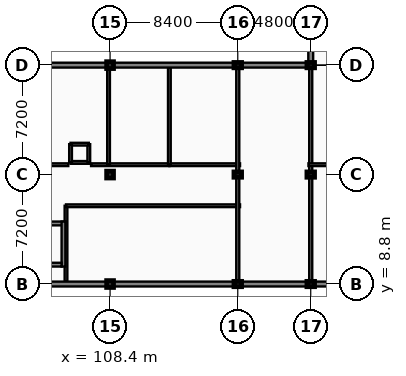
"""IFC4 building model, lengths in metres.
Left out: names, types, materials, properties, quantities, classifications, styles, units other than length and angle.
Written with IfcOpenShell. Run it as: python <this file> out.ifc"""

import sys

from ifc_helpers import new_model, si_unit, direction, frame, frame_2d, origin, origin_2d, place, context, subcontext, project, spatial, rectangle, extrude, element, fill, save


model = new_model("IFC4")
c1 = context("Model", 3, precision=1e-05, world=origin(), true_north=direction((0.0, 1.0)))
c2 = subcontext(c1, "Body", "Model", "MODEL_VIEW")
j1 = project(units=[si_unit("LENGTHUNIT", "METRE"), si_unit("PLANEANGLEUNIT", "RADIAN")], contexts=[c1])
p1 = place(None, origin())
s1 = spatial("IfcSite", under=j1, at=p1, CompositionType="ELEMENT")
p2 = place(p1, origin())
s2 = spatial("IfcBuilding", under=s1, at=p2, CompositionType="ELEMENT")
p3 = place(p2, origin())
s3 = spatial("IfcBuildingStorey", under=s2, at=p3, CompositionType="ELEMENT", Elevation=0.0)
for number, where, z_axis, x_axis in (
    (1, (108.4, 8.8, 0.0), (0.0, 0.0, 1.0), (1.0, 0.0, 0.0)),
    (2, (108.4, 16.0, 0.0), (0.0, 0.0, 1.0), (1.0, 0.0, 0.0)),
    (3, (108.4, 23.2, 0.0), (0.0, 0.0, 1.0), (1.0, 0.0, 0.0)),
):
    element("IfcColumn", number, at=place(p3, frame(where, z_axis=z_axis, x_axis=x_axis)), inside=s3, PredefinedType="COLUMN", context=c2, shape_type="SweptSolid", body=[
        extrude(rectangle(XDim=0.45, YDim=0.45, at=origin_2d()), origin(), (0.0, 0.0, 1.0), 5.4),
    ])
for number, where, z_axis, x_axis in (
    (4, (116.8, 8.8, 0.0), (0.0, 0.0, 1.0), (1.0, 0.0, 0.0)),
    (5, (116.8, 16.0, 0.0), (0.0, 0.0, 1.0), (1.0, 0.0, 0.0)),
    (6, (116.8, 23.2, 0.0), (0.0, 0.0, 1.0), (1.0, 0.0, 0.0)),
    (7, (121.6, 8.8, 0.0), (0.0, 0.0, 1.0), (1.0, 0.0, 0.0)),
    (8, (121.6, 16.0, 0.0), (0.0, 0.0, 1.0), (1.0, 0.0, 0.0)),
    (9, (121.6, 23.2, 0.0), (0.0, 0.0, 1.0), (1.0, 0.0, 0.0)),
):
    element("IfcColumn", number, at=place(p3, frame(where, z_axis=z_axis, x_axis=x_axis)), inside=s3, PredefinedType="PILASTER", context=c2, shape_type="SweptSolid", body=[
        extrude(rectangle(XDim=0.5, YDim=0.35, at=origin_2d()), origin(), (0.0, 0.0, 1.0), 5.4),
    ])
p4 = place(p3, frame((105.5, 8.95, 0.0), z_axis=(0.0, 0.0, 1.0), x_axis=(0.0, 1.0, 0.0)))
e10 = element("IfcWall", 10, at=p4, inside=s3, PredefinedType="PARTITIONING", context=c2, shape_type="SweptSolid", body=[
    extrude(rectangle(XDim=5.0, YDim=0.18, at=frame_2d((2.5, 0.0))), origin(), (0.0, 0.0, 1.0), 4.64),
])
p5 = place(p3, frame((105.5, 13.95, 0.0), z_axis=(0.0, 0.0, 1.0), x_axis=(1.0, 0.0, 0.0)))
e11 = element("IfcWall", 11, at=p5, inside=s3, PredefinedType="PARTITIONING", context=c2, shape_type="SweptSolid", body=[
    extrude(rectangle(XDim=11.45, YDim=0.18, at=frame_2d((5.725, 0.0))), origin(), (0.0, 0.0, 1.0), 4.64),
])
p6 = place(p5, frame((5.225, 0.0, -0.01)))
e12 = element("IfcOpeningElement", 12, at=p6, cuts=e11, PredefinedType="OPENING", context=c2, shape_type="SweptSolid", body=[
    extrude(rectangle(XDim=1.0, YDim=2.16, at=frame_2d((0.5, 1.08))), frame((0.0, 0.1, 0.0), z_axis=(0.0, -1.0, 0.0), x_axis=(1.0, 0.0, 0.0)), (0.0, 0.0, 1.0), 0.2),
])
p7 = place(p3, frame((91.45, 16.65, 0.0), z_axis=(0.0, 0.0, 1.0), x_axis=(1.0, 0.0, 0.0)))
e13 = element("IfcWall", 13, at=p7, inside=s3, PredefinedType="PARTITIONING", context=c2, shape_type="SweptSolid", body=[
    extrude(rectangle(XDim=14.2, YDim=0.18, at=frame_2d((7.1, 0.0))), origin(), (0.0, 0.0, 1.0), 4.64),
])
p8 = place(p7, frame((5.67, 0.0, -0.01)))
e14 = element("IfcOpeningElement", 14, at=p8, cuts=e13, PredefinedType="OPENING", context=c2, shape_type="SweptSolid", body=[
    extrude(rectangle(XDim=1.6, YDim=2.21, at=frame_2d((0.8, 1.105))), frame((0.0, 0.1, 0.0), z_axis=(0.0, -1.0, 0.0), x_axis=(1.0, 0.0, 0.0)), (0.0, 0.0, 1.0), 0.2),
])
p9 = place(p3, frame((107.15, 16.65, 0.0), z_axis=(0.0, 0.0, 1.0), x_axis=(1.0, 0.0, 0.0)))
e15 = element("IfcWall", 15, at=p9, inside=s3, PredefinedType="PARTITIONING", context=c2, shape_type="SweptSolid", body=[
    extrude(rectangle(XDim=5.15, YDim=0.18, at=frame_2d((2.575, 0.0))), origin(), (0.0, 0.0, 1.0), 4.64),
])
p10 = place(p9, frame((2.697, 0.0, -0.01)))
e16 = element("IfcOpeningElement", 16, at=p10, cuts=e15, PredefinedType="OPENING", context=c2, shape_type="SweptSolid", body=[
    extrude(rectangle(XDim=1.0, YDim=2.16, at=frame_2d((0.5, 1.08))), frame((0.0, 0.1, 0.0), z_axis=(0.0, -1.0, 0.0), x_axis=(1.0, 0.0, 0.0)), (0.0, 0.0, 1.0), 0.2),
])
p11 = place(p3, frame((112.3, 16.65, 0.0), z_axis=(0.0, 0.0, 1.0), x_axis=(1.0, 0.0, 0.0)))
e17 = element("IfcWall", 17, at=p11, inside=s3, PredefinedType="PARTITIONING", context=c2, shape_type="SweptSolid", body=[
    extrude(rectangle(XDim=4.65, YDim=0.18, at=frame_2d((2.325, 0.0))), origin(), (0.0, 0.0, 1.0), 4.64),
])
p12 = place(p11, frame((1.825, 0.0, -0.01)))
e18 = element("IfcOpeningElement", 18, at=p12, cuts=e17, PredefinedType="OPENING", context=c2, shape_type="SweptSolid", body=[
    extrude(rectangle(XDim=1.0, YDim=2.16, at=frame_2d((0.5, 1.08))), frame((0.0, 0.1, 0.0), z_axis=(0.0, -1.0, 0.0), x_axis=(1.0, 0.0, 0.0)), (0.0, 0.0, 1.0), 0.2),
])
for number, where, z_axis, x_axis in (
    (19, (108.3, 16.65, 0.0), (0.0, 0.0, 1.0), (0.0, 1.0, 0.0)),
    (20, (112.3, 16.65, 0.0), (0.0, 0.0, 1.0), (0.0, 1.0, 0.0)),
):
    element("IfcWall", number, at=place(p3, frame(where, z_axis=z_axis, x_axis=x_axis)), inside=s3, PredefinedType="PARTITIONING", context=c2, shape_type="SweptSolid", body=[
        extrude(rectangle(XDim=6.4, YDim=0.18, at=frame_2d((3.2, 0.0))), origin(), (0.0, 0.0, 1.0), 4.64),
    ])
p13 = place(p3, frame((116.8, 8.95, 0.0), z_axis=(0.0, 0.0, 1.0), x_axis=(0.0, 1.0, 0.0)))
e21 = element("IfcWall", 21, at=p13, inside=s3, PredefinedType="PARTITIONING", context=c2, shape_type="SweptSolid", body=[
    extrude(rectangle(XDim=14.1, YDim=0.2, at=frame_2d((7.05, 0.0))), origin(), (0.0, 0.0, 1.0), 3.99),
])
p14 = place(p13, frame((8.364, 0.0, -0.01)))
e22 = element("IfcOpeningElement", 22, at=p14, cuts=e21, PredefinedType="OPENING", context=c2, shape_type="SweptSolid", body=[
    extrude(rectangle(XDim=1.8, YDim=2.26, at=frame_2d((0.9, 1.13))), frame((0.0, 0.11, 0.0), z_axis=(0.0, -1.0, 0.0), x_axis=(1.0, 0.0, 0.0)), (0.0, 0.0, 1.0), 0.22),
])
p15 = place(p3, frame((121.6, 8.95, 0.0), z_axis=(0.0, 0.0, 1.0), x_axis=(0.0, 1.0, 0.0)))
e23 = element("IfcWall", 23, at=p15, inside=s3, PredefinedType="PARTITIONING", context=c2, shape_type="SweptSolid", body=[
    extrude(rectangle(XDim=14.1, YDim=0.2, at=frame_2d((7.05, 0.0))), origin(), (0.0, 0.0, 1.0), 3.99),
])
p16 = place(p15, frame((3.936, 0.0, -0.01)))
e24 = element("IfcOpeningElement", 24, at=p16, cuts=e23, PredefinedType="OPENING", context=c2, shape_type="SweptSolid", body=[
    extrude(rectangle(XDim=1.8, YDim=2.26, at=frame_2d((0.9, 1.13))), frame((0.0, 0.11, 0.0), z_axis=(0.0, -1.0, 0.0), x_axis=(1.0, 0.0, 0.0)), (0.0, 0.0, 1.0), 0.22),
])
p17 = place(p3, frame((121.45, 16.65, 0.0), z_axis=(0.0, 0.0, 1.0), x_axis=(1.0, 0.0, 0.0)))
e25 = element("IfcWall", 25, at=p17, inside=s3, PredefinedType="PARTITIONING", context=c2, shape_type="SweptSolid", body=[
    extrude(rectangle(XDim=15.1, YDim=0.18, at=frame_2d((7.55, 0.0))), origin(), (0.0, 0.0, 1.0), 4.64),
])
p18 = place(p17, frame((4.512, 0.0, -0.01)))
e26 = element("IfcOpeningElement", 26, at=p18, cuts=e25, PredefinedType="OPENING", context=c2, shape_type="SweptSolid", body=[
    extrude(rectangle(XDim=1.0, YDim=2.16, at=frame_2d((0.5, 1.08))), frame((0.0, 0.1, 0.0), z_axis=(0.0, -1.0, 0.0), x_axis=(1.0, 0.0, 0.0)), (0.0, 0.0, 1.0), 0.2),
])
p19 = place(p3, frame((100.0, 8.8, 0.0), z_axis=(0.0, 0.0, 1.0), x_axis=(1.0, 0.0, 0.0)))
e27 = element("IfcWall", 27, at=p19, inside=s3, PredefinedType="SOLIDWALL", context=c2, shape_type="SweptSolid", body=[
    extrude(rectangle(XDim=8.4, YDim=0.32, at=frame_2d((4.2, 0.0))), origin(), (0.0, 0.0, 1.0), 4.64),
])
p20 = place(p19, frame((3.2, 0.0, -0.01)))
e28 = element("IfcOpeningElement", 28, at=p20, cuts=e27, PredefinedType="OPENING", context=c2, shape_type="SweptSolid", body=[
    extrude(rectangle(XDim=2.0, YDim=2.41, at=frame_2d((1.0, 1.205))), frame((0.0, 0.17, 0.0), z_axis=(0.0, -1.0, 0.0), x_axis=(1.0, 0.0, 0.0)), (0.0, 0.0, 1.0), 0.34),
])
p21 = place(p3, frame((108.4, 8.8, 0.0), z_axis=(0.0, 0.0, 1.0), x_axis=(1.0, 0.0, 0.0)))
e29 = element("IfcWall", 29, at=p21, inside=s3, PredefinedType="SOLIDWALL", context=c2, shape_type="SweptSolid", body=[
    extrude(rectangle(XDim=8.4, YDim=0.32, at=frame_2d((4.2, 0.0))), origin(), (0.0, 0.0, 1.0), 3.99),
])
p22 = place(p21, frame((0.46, 0.0, 0.9)))
e30 = element("IfcOpeningElement", 30, at=p22, cuts=e29, PredefinedType="OPENING", context=c2, shape_type="SweptSolid", body=[
    extrude(rectangle(XDim=2.4, YDim=2.35, at=frame_2d((1.2, 1.175))), frame((0.0, 0.17, 0.0), z_axis=(0.0, -1.0, 0.0), x_axis=(1.0, 0.0, 0.0)), (0.0, 0.0, 1.0), 0.34),
])
p23 = place(p21, frame((5.46, 0.0, 0.9)))
e31 = element("IfcOpeningElement", 31, at=p23, cuts=e29, PredefinedType="OPENING", context=c2, shape_type="SweptSolid", body=[
    extrude(rectangle(XDim=2.4, YDim=2.35, at=frame_2d((1.2, 1.175))), frame((0.0, 0.17, 0.0), z_axis=(0.0, -1.0, 0.0), x_axis=(1.0, 0.0, 0.0)), (0.0, 0.0, 1.0), 0.34),
])
p24 = place(p3, frame((108.4, 23.2, 0.0), z_axis=(0.0, 0.0, 1.0), x_axis=(-1.0, 0.0, 0.0)))
e32 = element("IfcWall", 32, at=p24, inside=s3, PredefinedType="SOLIDWALL", context=c2, shape_type="SweptSolid", body=[
    extrude(rectangle(XDim=8.4, YDim=0.32, at=frame_2d((4.2, 0.0))), origin(), (0.0, 0.0, 1.0), 4.64),
])
p25 = place(p24, frame((0.46, 0.0, 0.9)))
e33 = element("IfcOpeningElement", 33, at=p25, cuts=e32, PredefinedType="OPENING", context=c2, shape_type="SweptSolid", body=[
    extrude(rectangle(XDim=2.4, YDim=2.35, at=frame_2d((1.2, 1.175))), frame((0.0, 0.17, 0.0), z_axis=(0.0, -1.0, 0.0), x_axis=(1.0, 0.0, 0.0)), (0.0, 0.0, 1.0), 0.34),
])
p26 = place(p24, frame((5.46, 0.0, 0.9)))
e34 = element("IfcOpeningElement", 34, at=p26, cuts=e32, PredefinedType="OPENING", context=c2, shape_type="SweptSolid", body=[
    extrude(rectangle(XDim=2.4, YDim=2.35, at=frame_2d((1.2, 1.175))), frame((0.0, 0.17, 0.0), z_axis=(0.0, -1.0, 0.0), x_axis=(1.0, 0.0, 0.0)), (0.0, 0.0, 1.0), 0.34),
])
p27 = place(p3, frame((116.8, 23.2, 0.0), z_axis=(0.0, 0.0, 1.0), x_axis=(-1.0, 0.0, 0.0)))
e35 = element("IfcWall", 35, at=p27, inside=s3, PredefinedType="SOLIDWALL", context=c2, shape_type="SweptSolid", body=[
    extrude(rectangle(XDim=8.4, YDim=0.32, at=frame_2d((4.2, 0.0))), origin(), (0.0, 0.0, 1.0), 3.99),
])
p28 = place(p27, frame((0.46, 0.0, 0.9)))
e36 = element("IfcOpeningElement", 36, at=p28, cuts=e35, PredefinedType="OPENING", context=c2, shape_type="SweptSolid", body=[
    extrude(rectangle(XDim=2.4, YDim=2.35, at=frame_2d((1.2, 1.175))), frame((0.0, 0.17, 0.0), z_axis=(0.0, -1.0, 0.0), x_axis=(1.0, 0.0, 0.0)), (0.0, 0.0, 1.0), 0.34),
])
p29 = place(p27, frame((5.46, 0.0, 0.9)))
e37 = element("IfcOpeningElement", 37, at=p29, cuts=e35, PredefinedType="OPENING", context=c2, shape_type="SweptSolid", body=[
    extrude(rectangle(XDim=2.4, YDim=2.35, at=frame_2d((1.2, 1.175))), frame((0.0, 0.17, 0.0), z_axis=(0.0, -1.0, 0.0), x_axis=(1.0, 0.0, 0.0)), (0.0, 0.0, 1.0), 0.34),
])
p30 = place(p3, frame((121.6, 8.8, 0.0), z_axis=(0.0, 0.0, 1.0), x_axis=(1.0, 0.0, 0.0)))
e38 = element("IfcWall", 38, at=p30, inside=s3, PredefinedType="SOLIDWALL", context=c2, shape_type="SweptSolid", body=[
    extrude(rectangle(XDim=7.8, YDim=0.32, at=frame_2d((3.9, 0.0))), origin(), (0.0, 0.0, 1.0), 3.99),
])
p31 = place(p30, frame((4.06, 0.0, 0.9)))
e39 = element("IfcOpeningElement", 39, at=p31, cuts=e38, PredefinedType="OPENING", context=c2, shape_type="SweptSolid", body=[
    extrude(rectangle(XDim=2.4, YDim=2.35, at=frame_2d((1.2, 1.175))), frame((0.0, 0.17, 0.0), z_axis=(0.0, -1.0, 0.0), x_axis=(1.0, 0.0, 0.0)), (0.0, 0.0, 1.0), 0.34),
])
p32 = place(p3, frame((121.6, 30.4, 0.0), z_axis=(0.0, 0.0, 1.0), x_axis=(0.0, -1.0, 0.0)))
e40 = element("IfcWall", 40, at=p32, inside=s3, PredefinedType="SOLIDWALL", context=c2, shape_type="SweptSolid", body=[
    extrude(rectangle(XDim=7.2, YDim=0.32, at=frame_2d((3.6, 0.0))), origin(), (0.0, 0.0, 1.0), 3.99),
])
p33 = place(p32, frame((2.6, 0.0, -0.01)))
e41 = element("IfcOpeningElement", 41, at=p33, cuts=e40, PredefinedType="OPENING", context=c2, shape_type="SweptSolid", body=[
    extrude(rectangle(XDim=2.0, YDim=2.41, at=frame_2d((1.0, 1.205))), frame((0.0, 0.17, 0.0), z_axis=(0.0, -1.0, 0.0), x_axis=(1.0, 0.0, 0.0)), (0.0, 0.0, 1.0), 0.34),
])
p34 = place(p3, frame((116.8, 8.8, 0.0), z_axis=(0.0, 0.0, 1.0), x_axis=(1.0, 0.0, 0.0)))
e42 = element("IfcWall", 42, at=p34, inside=s3, PredefinedType="SOLIDWALL", context=c2, shape_type="SweptSolid", body=[
    extrude(rectangle(XDim=4.8, YDim=0.32, at=frame_2d((2.4, 0.0))), origin(), (0.0, 0.0, 1.0), 3.99),
])
p35 = place(p34, frame((1.46, 0.0, 0.9)))
e43 = element("IfcOpeningElement", 43, at=p35, cuts=e42, PredefinedType="OPENING", context=c2, shape_type="SweptSolid", body=[
    extrude(rectangle(XDim=1.8, YDim=2.2, at=frame_2d((0.9, 1.1))), frame((0.0, 0.17, 0.0), z_axis=(0.0, -1.0, 0.0), x_axis=(1.0, 0.0, 0.0)), (0.0, 0.0, 1.0), 0.34),
])
p36 = place(p3, frame((121.6, 23.2, 0.0), z_axis=(0.0, 0.0, 1.0), x_axis=(-1.0, 0.0, 0.0)))
e44 = element("IfcWall", 44, at=p36, inside=s3, PredefinedType="SOLIDWALL", context=c2, shape_type="SweptSolid", body=[
    extrude(rectangle(XDim=4.8, YDim=0.32, at=frame_2d((2.4, 0.0))), origin(), (0.0, 0.0, 1.0), 3.99),
])
p37 = place(p36, frame((1.46, 0.0, 0.9)))
e45 = element("IfcOpeningElement", 45, at=p37, cuts=e44, PredefinedType="OPENING", context=c2, shape_type="SweptSolid", body=[
    extrude(rectangle(XDim=1.8, YDim=2.2, at=frame_2d((0.9, 1.1))), frame((0.0, 0.17, 0.0), z_axis=(0.0, -1.0, 0.0), x_axis=(1.0, 0.0, 0.0)), (0.0, 0.0, 1.0), 0.34),
])
p38 = place(p3, frame((103.25, 12.785, 0.0), z_axis=(0.0, 0.0, 1.0), x_axis=(1.0, 0.0, 0.0)))
e46 = element("IfcWall", 46, at=p38, inside=s3, PredefinedType="SHEAR", context=c2, shape_type="SweptSolid", body=[
    extrude(rectangle(XDim=2.21, YDim=0.25, at=frame_2d((1.105, 0.0))), origin(), (0.0, 0.0, 1.0), 5.4),
])
p39 = place(p3, frame((105.335, 9.95, 0.0), z_axis=(0.0, 0.0, 1.0), x_axis=(0.0, 1.0, 0.0)))
e47 = element("IfcWall", 47, at=p39, inside=s3, PredefinedType="SHEAR", context=c2, shape_type="SweptSolid", body=[
    extrude(rectangle(XDim=2.96, YDim=0.25, at=frame_2d((1.48, 0.0))), origin(), (0.0, 0.0, 1.0), 5.4),
])
p40 = place(p3, frame((103.25, 10.075, 0.0), z_axis=(0.0, 0.0, 1.0), x_axis=(1.0, 0.0, 0.0)))
e48 = element("IfcWall", 48, at=p40, inside=s3, PredefinedType="SHEAR", context=c2, shape_type="SweptSolid", body=[
    extrude(rectangle(XDim=1.96, YDim=0.25, at=frame_2d((0.98, 0.0))), origin(), (0.0, 0.0, 1.0), 5.4),
])
p41 = place(p40, frame((0.43, 0.0, -0.01)))
e49 = element("IfcOpeningElement", 49, at=p41, cuts=e48, PredefinedType="OPENING", context=c2, shape_type="SweptSolid", body=[
    extrude(rectangle(XDim=1.1, YDim=2.16, at=frame_2d((0.55, 1.08))), frame((0.0, 0.135, 0.0), z_axis=(0.0, -1.0, 0.0), x_axis=(1.0, 0.0, 0.0)), (0.0, 0.0, 1.0), 0.27),
])
p42 = place(p3, frame((105.8, 16.8, 0.0), z_axis=(0.0, 0.0, 1.0), x_axis=(1.0, 0.0, 0.0)))
e50 = element("IfcWall", 50, at=p42, inside=s3, PredefinedType="SOLIDWALL", context=c2, shape_type="SweptSolid", body=[
    extrude(rectangle(XDim=1.2, YDim=0.18, at=frame_2d((0.6, 0.0))), origin(), (0.0, 0.0, 1.0), 5.07),
])
p43 = place(p42, frame((0.2, 0.0, -0.01)))
e51 = element("IfcOpeningElement", 51, at=p43, cuts=e50, PredefinedType="OPENING", context=c2, shape_type="SweptSolid", body=[
    extrude(rectangle(XDim=0.8, YDim=2.06, at=frame_2d((0.4, 1.03))), frame((0.0, 0.1, 0.0), z_axis=(0.0, -1.0, 0.0), x_axis=(1.0, 0.0, 0.0)), (0.0, 0.0, 1.0), 0.2),
])
for number, where, z_axis, x_axis in (
    (52, (107.0, 16.8, 0.0), (0.0, 0.0, 1.0), (0.0, 1.0, 0.0)),
    (53, (107.0, 18.0, 0.0), (0.0, 0.0, 1.0), (-1.0, 0.0, 0.0)),
    (54, (105.8, 18.0, 0.0), (0.0, 0.0, 1.0), (0.0, -1.0, 0.0)),
):
    element("IfcWall", number, at=place(p3, frame(where, z_axis=z_axis, x_axis=x_axis)), inside=s3, PredefinedType="SOLIDWALL", context=c2, shape_type="SweptSolid", body=[
        extrude(rectangle(XDim=1.2, YDim=0.18, at=frame_2d((0.6, 0.0))), origin(), (0.0, 0.0, 1.0), 5.07),
    ])
p44 = place(p6, frame((0.0, 0.0, 0.01)))
e55 = element("IfcDoor", 55, at=p44, inside=s3, OperationType="SINGLE_SWING_RIGHT", PredefinedType="DOOR", context=c2, shape_type="SweptSolid", body=[
    extrude(rectangle(XDim=1.0, YDim=2.15, at=frame_2d((0.5, 1.075))), frame((0.0, 0.025, 0.0), z_axis=(0.0, -1.0, 0.0), x_axis=(1.0, 0.0, 0.0)), (0.0, 0.0, 1.0), 0.05),
])
fill(e12, e55)
p45 = place(p10, frame((1.0, 0.0, 0.01), z_axis=(0.0, 0.0, 1.0), x_axis=(-1.0, 0.0, 0.0)))
e56 = element("IfcDoor", 56, at=p45, inside=s3, OperationType="SINGLE_SWING_RIGHT", PredefinedType="DOOR", context=c2, shape_type="SweptSolid", body=[
    extrude(rectangle(XDim=1.0, YDim=2.15, at=frame_2d((0.5, 1.075))), frame((0.0, 0.025, 0.0), z_axis=(0.0, -1.0, 0.0), x_axis=(1.0, 0.0, 0.0)), (0.0, 0.0, 1.0), 0.05),
])
fill(e16, e56)
p46 = place(p12, frame((0.0, 0.0, 0.01)))
e57 = element("IfcDoor", 57, at=p46, inside=s3, OperationType="SINGLE_SWING_LEFT", PredefinedType="DOOR", context=c2, shape_type="SweptSolid", body=[
    extrude(rectangle(XDim=1.0, YDim=2.15, at=frame_2d((0.5, 1.075))), frame((0.0, 0.025, 0.0), z_axis=(0.0, -1.0, 0.0), x_axis=(1.0, 0.0, 0.0)), (0.0, 0.0, 1.0), 0.05),
])
fill(e18, e57)
p47 = place(p14, frame((0.0, 0.0, 0.01)))
e58 = element("IfcDoor", 58, at=p47, inside=s3, OperationType="DOUBLE_SWING_LEFT", PredefinedType="DOOR", context=c2, shape_type="SweptSolid", body=[
    extrude(rectangle(XDim=1.8, YDim=2.25, at=frame_2d((0.9, 1.125))), frame((0.0, 0.025, 0.0), z_axis=(0.0, -1.0, 0.0), x_axis=(1.0, 0.0, 0.0)), (0.0, 0.0, 1.0), 0.05),
])
fill(e22, e58)
p48 = place(p16, frame((1.8, 0.0, 0.01), z_axis=(0.0, 0.0, 1.0), x_axis=(-1.0, 0.0, 0.0)))
e59 = element("IfcDoor", 59, at=p48, inside=s3, OperationType="DOUBLE_SWING_LEFT", PredefinedType="DOOR", context=c2, shape_type="SweptSolid", body=[
    extrude(rectangle(XDim=1.8, YDim=2.25, at=frame_2d((0.9, 1.125))), frame((0.0, 0.025, 0.0), z_axis=(0.0, -1.0, 0.0), x_axis=(1.0, 0.0, 0.0)), (0.0, 0.0, 1.0), 0.05),
])
fill(e24, e59)
p49 = place(p20, frame((0.0, 0.0, 0.01)))
e60 = element("IfcDoor", 60, at=p49, inside=s3, OperationType="DOUBLE_SWING_LEFT", PredefinedType="DOOR", context=c2, shape_type="SweptSolid", body=[
    extrude(rectangle(XDim=2.0, YDim=2.4, at=frame_2d((1.0, 1.2))), frame((0.0, 0.025, 0.0), z_axis=(0.0, -1.0, 0.0), x_axis=(1.0, 0.0, 0.0)), (0.0, 0.0, 1.0), 0.05),
])
fill(e28, e60)
p50 = place(p22, origin())
e61 = element("IfcWindow", 61, at=p50, inside=s3, PartitioningType="TRIPLE_PANEL_VERTICAL", PredefinedType="WINDOW", context=c2, shape_type="SweptSolid", body=[
    extrude(rectangle(XDim=2.4, YDim=2.35, at=frame_2d((1.2, 1.175))), frame((0.0, 0.03, 0.0), z_axis=(0.0, -1.0, 0.0), x_axis=(1.0, 0.0, 0.0)), (0.0, 0.0, 1.0), 0.06),
])
fill(e30, e61)
p51 = place(p23, origin())
e62 = element("IfcWindow", 62, at=p51, inside=s3, PartitioningType="TRIPLE_PANEL_VERTICAL", PredefinedType="WINDOW", context=c2, shape_type="SweptSolid", body=[
    extrude(rectangle(XDim=2.4, YDim=2.35, at=frame_2d((1.2, 1.175))), frame((0.0, 0.03, 0.0), z_axis=(0.0, -1.0, 0.0), x_axis=(1.0, 0.0, 0.0)), (0.0, 0.0, 1.0), 0.06),
])
fill(e31, e62)
p52 = place(p25, origin())
e63 = element("IfcWindow", 63, at=p52, inside=s3, PartitioningType="TRIPLE_PANEL_VERTICAL", PredefinedType="WINDOW", context=c2, shape_type="SweptSolid", body=[
    extrude(rectangle(XDim=2.4, YDim=2.35, at=frame_2d((1.2, 1.175))), frame((0.0, 0.03, 0.0), z_axis=(0.0, -1.0, 0.0), x_axis=(1.0, 0.0, 0.0)), (0.0, 0.0, 1.0), 0.06),
])
fill(e33, e63)
p53 = place(p28, origin())
e64 = element("IfcWindow", 64, at=p53, inside=s3, PartitioningType="TRIPLE_PANEL_VERTICAL", PredefinedType="WINDOW", context=c2, shape_type="SweptSolid", body=[
    extrude(rectangle(XDim=2.4, YDim=2.35, at=frame_2d((1.2, 1.175))), frame((0.0, 0.03, 0.0), z_axis=(0.0, -1.0, 0.0), x_axis=(1.0, 0.0, 0.0)), (0.0, 0.0, 1.0), 0.06),
])
fill(e36, e64)
p54 = place(p29, origin())
e65 = element("IfcWindow", 65, at=p54, inside=s3, PartitioningType="TRIPLE_PANEL_VERTICAL", PredefinedType="WINDOW", context=c2, shape_type="SweptSolid", body=[
    extrude(rectangle(XDim=2.4, YDim=2.35, at=frame_2d((1.2, 1.175))), frame((0.0, 0.03, 0.0), z_axis=(0.0, -1.0, 0.0), x_axis=(1.0, 0.0, 0.0)), (0.0, 0.0, 1.0), 0.06),
])
fill(e37, e65)
p55 = place(p35, origin())
e66 = element("IfcWindow", 66, at=p55, inside=s3, PartitioningType="DOUBLE_PANEL_VERTICAL", PredefinedType="WINDOW", context=c2, shape_type="SweptSolid", body=[
    extrude(rectangle(XDim=1.8, YDim=2.2, at=frame_2d((0.9, 1.1))), frame((0.0, 0.03, 0.0), z_axis=(0.0, -1.0, 0.0), x_axis=(1.0, 0.0, 0.0)), (0.0, 0.0, 1.0), 0.06),
])
fill(e43, e66)
p56 = place(p37, origin())
e67 = element("IfcWindow", 67, at=p56, inside=s3, PartitioningType="DOUBLE_PANEL_VERTICAL", PredefinedType="WINDOW", context=c2, shape_type="SweptSolid", body=[
    extrude(rectangle(XDim=1.8, YDim=2.2, at=frame_2d((0.9, 1.1))), frame((0.0, 0.03, 0.0), z_axis=(0.0, -1.0, 0.0), x_axis=(1.0, 0.0, 0.0)), (0.0, 0.0, 1.0), 0.06),
])
fill(e45, e67)
p57 = place(p41, frame((0.0, 0.0, 0.01)))
e68 = element("IfcDoor", 68, at=p57, inside=s3, OperationType="SLIDING_TO_LEFT", PredefinedType="DOOR", context=c2, shape_type="SweptSolid", body=[
    extrude(rectangle(XDim=1.1, YDim=2.15, at=frame_2d((0.55, 1.075))), frame((0.0, 0.025, 0.0), z_axis=(0.0, -1.0, 0.0), x_axis=(1.0, 0.0, 0.0)), (0.0, 0.0, 1.0), 0.05),
])
fill(e49, e68)
p58 = place(p43, frame((0.0, 0.0, 0.01)))
e69 = element("IfcDoor", 69, at=p58, inside=s3, OperationType="SINGLE_SWING_LEFT", PredefinedType="DOOR", context=c2, shape_type="SweptSolid", body=[
    extrude(rectangle(XDim=0.8, YDim=2.05, at=frame_2d((0.4, 1.025))), frame((0.0, 0.025, 0.0), z_axis=(0.0, -1.0, 0.0), x_axis=(1.0, 0.0, 0.0)), (0.0, 0.0, 1.0), 0.05),
])
fill(e51, e69)
save(model, sys.argv[1])
